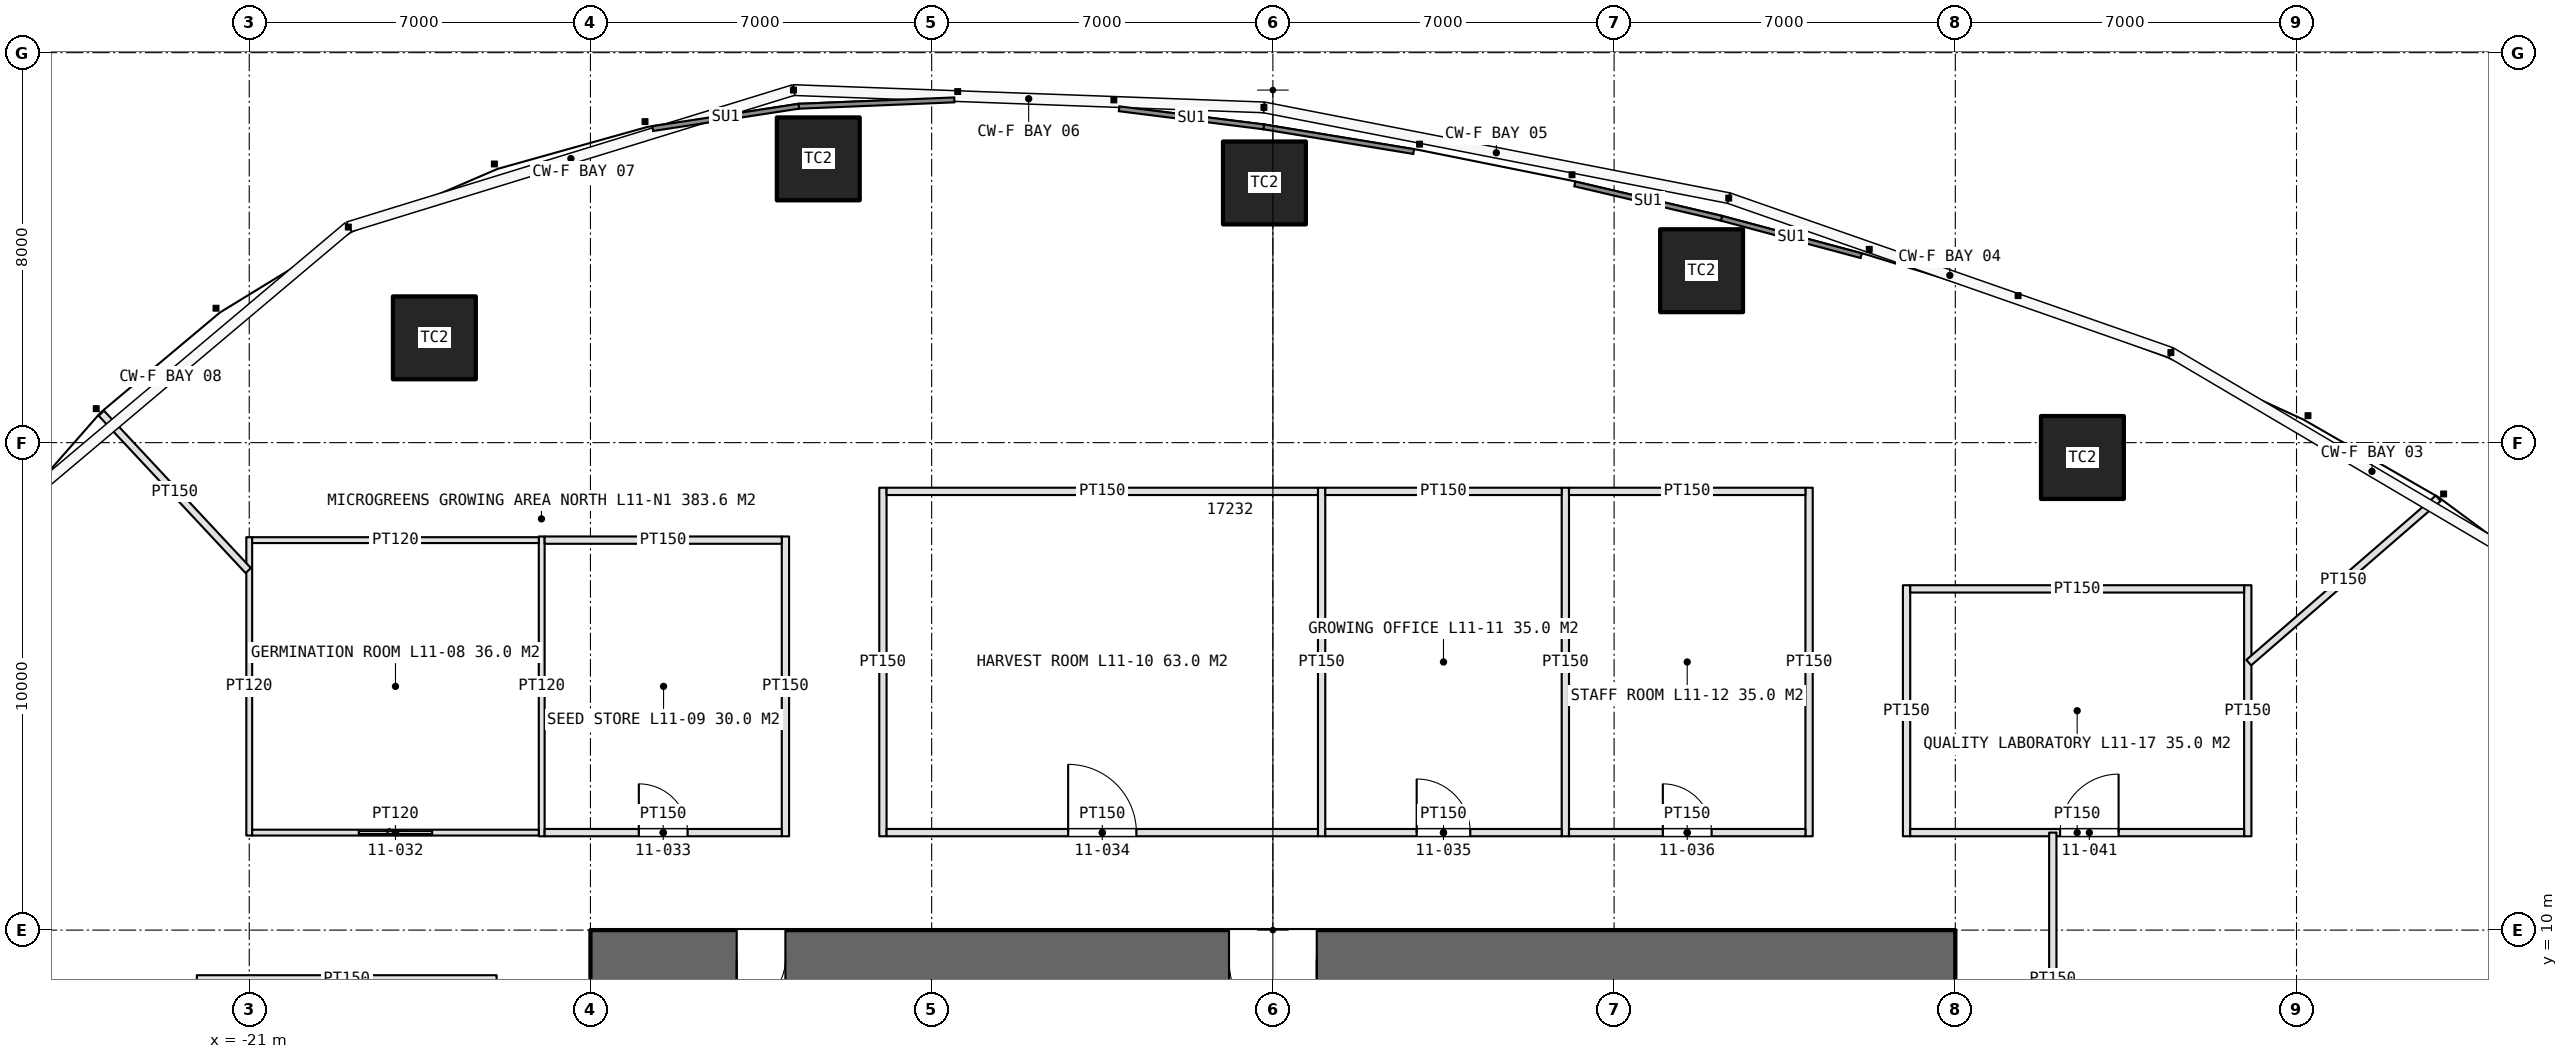
"""IFC4 building model, lengths in metres.
Left out: names, types, materials, properties, quantities, classifications, styles, units other than length and angle.
Written with IfcOpenShell. Run it as: python <this file> out.ifc"""

import sys

from ifc_helpers import new_model, si_unit, direction, frame, frame_2d, origin, origin_2d, place, context, subcontext, project, spatial, rectangle, extrude, element, fill, save


model = new_model("IFC4")
c1 = context("Model", 3, precision=1e-05, world=origin(), true_north=direction((0.0, 1.0)))
c2 = subcontext(c1, "Body", "Model", "MODEL_VIEW")
j1 = project(units=[si_unit("LENGTHUNIT", "METRE"), si_unit("PLANEANGLEUNIT", "RADIAN")], contexts=[c1])
p1 = place(None, origin())
s1 = spatial("IfcSite", under=j1, at=p1, CompositionType="ELEMENT")
p2 = place(p1, origin())
s2 = spatial("IfcBuilding", under=s1, at=p2, CompositionType="ELEMENT")
p3 = place(p2, frame((0.0, 0.0, 55.0)))
s3 = spatial("IfcBuildingStorey", under=s2, at=p3, CompositionType="ELEMENT", Elevation=55.0)
p4 = place(p3, frame((14.0, 9.4, 0.0), z_axis=(0.0, 0.0, 1.0), x_axis=(-1.0, 0.0, 0.0)))
e1 = element("IfcWall", 1, at=p4, inside=s3, PredefinedType="SHEAR", context=c2, shape_type="SweptSolid", body=[
    extrude(rectangle(XDim=28.0, YDim=1.2, at=frame_2d((14.0, 0.0))), origin(), (0.0, 0.0, 1.0), 5.0),
])
p5 = place(p4, frame((24.0, 0.0, 0.0)))
e2 = element("IfcOpeningElement", 2, at=p5, cuts=e1, PredefinedType="OPENING", context=c2, shape_type="SweptSolid", body=[
    extrude(rectangle(XDim=1.0, YDim=2.4, at=frame_2d((0.5, 1.2))), frame((0.0, 0.61, 0.0), z_axis=(0.0, -1.0, 0.0), x_axis=(1.0, 0.0, 0.0)), (0.0, 0.0, 1.0), 1.22),
])
p6 = place(p4, frame((13.1, 0.0, 0.0)))
e3 = element("IfcOpeningElement", 3, at=p6, cuts=e1, PredefinedType="OPENING", context=c2, shape_type="SweptSolid", body=[
    extrude(rectangle(XDim=1.8, YDim=2.4, at=frame_2d((0.9, 1.2))), frame((0.0, 0.61, 0.0), z_axis=(0.0, -1.0, 0.0), x_axis=(1.0, 0.0, 0.0)), (0.0, 0.0, 1.0), 1.22),
])
for number, where, z_axis, x_axis in (
    (4, (16.608, 19.695, 0.0), (0.0, 0.0, 1.0), (1.0, 0.0, 0.0)),
    (5, (8.795, 23.527, 0.0), (0.0, 0.0, 1.0), (1.0, 0.0, 0.0)),
    (6, (-0.173, 25.327, 0.0), (0.0, 0.0, 1.0), (1.0, 0.0, 0.0)),
    (7, (-9.326, 25.821, 0.0), (0.0, 0.0, 1.0), (1.0, 0.0, 0.0)),
    (8, (-17.202, 22.15, 0.0), (0.0, 0.0, 1.0), (1.0, 0.0, 0.0)),
):
    element("IfcColumn", number, at=place(p3, frame(where, z_axis=z_axis, x_axis=x_axis)), inside=s3, PredefinedType="COLUMN", context=c2, shape_type="SweptSolid", body=[
        extrude(rectangle(XDim=1.7, YDim=1.7, at=origin_2d()), origin(), (0.0, 0.0, 1.0), 5.0),
    ])
p7 = place(p3, frame((-21.0, 11.94, 0.0), z_axis=(0.0, 0.0, 1.0), x_axis=(0.0, 1.0, 0.0)))
e9 = element("IfcWall", 9, at=p7, inside=s3, PredefinedType="PARTITIONING", context=c2, shape_type="SweptSolid", body=[
    extrude(rectangle(XDim=6.12, YDim=0.12, at=frame_2d((3.06, 0.0))), origin(), (0.0, 0.0, 1.0), 3.6),
])
p8 = place(p3, frame((-15.0, 11.925, 0.0), z_axis=(0.0, 0.0, 1.0), x_axis=(0.0, 1.0, 0.0)))
e10 = element("IfcWall", 10, at=p8, inside=s3, PredefinedType="PARTITIONING", context=c2, shape_type="SweptSolid", body=[
    extrude(rectangle(XDim=6.15, YDim=0.12, at=frame_2d((3.075, 0.0))), origin(), (0.0, 0.0, 1.0), 3.6),
])
p9 = place(p3, frame((-10.0, 11.925, 0.0), z_axis=(0.0, 0.0, 1.0), x_axis=(0.0, 1.0, 0.0)))
e11 = element("IfcWall", 11, at=p9, inside=s3, PredefinedType="PARTITIONING", context=c2, shape_type="SweptSolid", body=[
    extrude(rectangle(XDim=6.15, YDim=0.15, at=frame_2d((3.075, 0.0))), origin(), (0.0, 0.0, 1.0), 3.6),
])
p10 = place(p3, frame((-20.94, 12.0, 0.0), z_axis=(0.0, 0.0, 1.0), x_axis=(1.0, 0.0, 0.0)))
e12 = element("IfcWall", 12, at=p10, inside=s3, PredefinedType="PARTITIONING", context=c2, shape_type="SweptSolid", body=[
    extrude(rectangle(XDim=5.88, YDim=0.12, at=frame_2d((2.94, 0.0))), origin(), (0.0, 0.0, 1.0), 3.6),
])
p11 = place(p10, frame((2.19, 0.0, 0.0)))
e13 = element("IfcOpeningElement", 13, at=p11, cuts=e12, PredefinedType="OPENING", context=c2, shape_type="SweptSolid", body=[
    extrude(rectangle(XDim=1.5, YDim=2.5, at=frame_2d((0.75, 1.25))), frame((0.0, 0.07, 0.0), z_axis=(0.0, -1.0, 0.0), x_axis=(1.0, 0.0, 0.0)), (0.0, 0.0, 1.0), 0.14),
])
p12 = place(p3, frame((-20.94, 18.0, 0.0), z_axis=(0.0, 0.0, 1.0), x_axis=(1.0, 0.0, 0.0)))
e14 = element("IfcWall", 14, at=p12, inside=s3, PredefinedType="PARTITIONING", context=c2, shape_type="SweptSolid", body=[
    extrude(rectangle(XDim=5.88, YDim=0.12, at=frame_2d((2.94, 0.0))), origin(), (0.0, 0.0, 1.0), 3.6),
])
p13 = place(p3, frame((-14.94, 12.0, 0.0), z_axis=(0.0, 0.0, 1.0), x_axis=(1.0, 0.0, 0.0)))
e15 = element("IfcWall", 15, at=p13, inside=s3, PredefinedType="PARTITIONING", context=c2, shape_type="SweptSolid", body=[
    extrude(rectangle(XDim=4.865, YDim=0.15, at=frame_2d((2.433, 0.0))), origin(), (0.0, 0.0, 1.0), 3.6),
])
p14 = place(p13, frame((1.933, 0.0, 0.0)))
e16 = element("IfcOpeningElement", 16, at=p14, cuts=e15, PredefinedType="OPENING", context=c2, shape_type="SweptSolid", body=[
    extrude(rectangle(XDim=1.0, YDim=2.2, at=frame_2d((0.5, 1.1))), frame((0.0, 0.085, 0.0), z_axis=(0.0, -1.0, 0.0), x_axis=(1.0, 0.0, 0.0)), (0.0, 0.0, 1.0), 0.17),
])
p15 = place(p3, frame((-14.94, 18.0, 0.0), z_axis=(0.0, 0.0, 1.0), x_axis=(1.0, 0.0, 0.0)))
e17 = element("IfcWall", 17, at=p15, inside=s3, PredefinedType="PARTITIONING", context=c2, shape_type="SweptSolid", body=[
    extrude(rectangle(XDim=4.865, YDim=0.15, at=frame_2d((2.433, 0.0))), origin(), (0.0, 0.0, 1.0), 3.6),
])
for number, where, z_axis, x_axis in (
    (18, (-8.0, 11.925, 0.0), (0.0, 0.0, 1.0), (0.0, 1.0, 0.0)),
    (19, (1.0, 11.925, 0.0), (0.0, 0.0, 1.0), (0.0, 1.0, 0.0)),
    (20, (6.0, 11.925, 0.0), (0.0, 0.0, 1.0), (0.0, 1.0, 0.0)),
    (21, (11.0, 11.925, 0.0), (0.0, 0.0, 1.0), (0.0, 1.0, 0.0)),
):
    element("IfcWall", number, at=place(p3, frame(where, z_axis=z_axis, x_axis=x_axis)), inside=s3, PredefinedType="PARTITIONING", context=c2, shape_type="SweptSolid", body=[
        extrude(rectangle(XDim=7.15, YDim=0.15, at=frame_2d((3.575, 0.0))), origin(), (0.0, 0.0, 1.0), 3.6),
    ])
p16 = place(p3, frame((-7.925, 12.0, 0.0), z_axis=(0.0, 0.0, 1.0), x_axis=(1.0, 0.0, 0.0)))
e22 = element("IfcWall", 22, at=p16, inside=s3, PredefinedType="PARTITIONING", context=c2, shape_type="SweptSolid", body=[
    extrude(rectangle(XDim=8.85, YDim=0.15, at=frame_2d((4.425, 0.0))), origin(), (0.0, 0.0, 1.0), 3.6),
])
p17 = place(p16, frame((3.725, 0.0, 0.0)))
e23 = element("IfcOpeningElement", 23, at=p17, cuts=e22, PredefinedType="OPENING", context=c2, shape_type="SweptSolid", body=[
    extrude(rectangle(XDim=1.4, YDim=2.4, at=frame_2d((0.7, 1.2))), frame((0.0, 0.085, 0.0), z_axis=(0.0, -1.0, 0.0), x_axis=(1.0, 0.0, 0.0)), (0.0, 0.0, 1.0), 0.17),
])
p18 = place(p3, frame((-7.925, 19.0, 0.0), z_axis=(0.0, 0.0, 1.0), x_axis=(1.0, 0.0, 0.0)))
e24 = element("IfcWall", 24, at=p18, inside=s3, PredefinedType="PARTITIONING", context=c2, shape_type="SweptSolid", body=[
    extrude(rectangle(XDim=8.85, YDim=0.15, at=frame_2d((4.425, 0.0))), origin(), (0.0, 0.0, 1.0), 3.6),
])
p19 = place(p3, frame((1.075, 12.0, 0.0), z_axis=(0.0, 0.0, 1.0), x_axis=(1.0, 0.0, 0.0)))
e25 = element("IfcWall", 25, at=p19, inside=s3, PredefinedType="PARTITIONING", context=c2, shape_type="SweptSolid", body=[
    extrude(rectangle(XDim=4.85, YDim=0.15, at=frame_2d((2.425, 0.0))), origin(), (0.0, 0.0, 1.0), 3.6),
])
p20 = place(p19, frame((1.875, 0.0, 0.0)))
e26 = element("IfcOpeningElement", 26, at=p20, cuts=e25, PredefinedType="OPENING", context=c2, shape_type="SweptSolid", body=[
    extrude(rectangle(XDim=1.1, YDim=2.3, at=frame_2d((0.55, 1.15))), frame((0.0, 0.085, 0.0), z_axis=(0.0, -1.0, 0.0), x_axis=(1.0, 0.0, 0.0)), (0.0, 0.0, 1.0), 0.17),
])
p21 = place(p3, frame((1.075, 19.0, 0.0), z_axis=(0.0, 0.0, 1.0), x_axis=(1.0, 0.0, 0.0)))
e27 = element("IfcWall", 27, at=p21, inside=s3, PredefinedType="PARTITIONING", context=c2, shape_type="SweptSolid", body=[
    extrude(rectangle(XDim=4.85, YDim=0.15, at=frame_2d((2.425, 0.0))), origin(), (0.0, 0.0, 1.0), 3.6),
])
p22 = place(p3, frame((6.075, 12.0, 0.0), z_axis=(0.0, 0.0, 1.0), x_axis=(1.0, 0.0, 0.0)))
e28 = element("IfcWall", 28, at=p22, inside=s3, PredefinedType="PARTITIONING", context=c2, shape_type="SweptSolid", body=[
    extrude(rectangle(XDim=4.85, YDim=0.15, at=frame_2d((2.425, 0.0))), origin(), (0.0, 0.0, 1.0), 3.6),
])
p23 = place(p22, frame((1.925, 0.0, 0.0)))
e29 = element("IfcOpeningElement", 29, at=p23, cuts=e28, PredefinedType="OPENING", context=c2, shape_type="SweptSolid", body=[
    extrude(rectangle(XDim=1.0, YDim=2.2, at=frame_2d((0.5, 1.1))), frame((0.0, 0.085, 0.0), z_axis=(0.0, -1.0, 0.0), x_axis=(1.0, 0.0, 0.0)), (0.0, 0.0, 1.0), 0.17),
])
p24 = place(p3, frame((6.075, 19.0, 0.0), z_axis=(0.0, 0.0, 1.0), x_axis=(1.0, 0.0, 0.0)))
e30 = element("IfcWall", 30, at=p24, inside=s3, PredefinedType="PARTITIONING", context=c2, shape_type="SweptSolid", body=[
    extrude(rectangle(XDim=4.85, YDim=0.15, at=frame_2d((2.425, 0.0))), origin(), (0.0, 0.0, 1.0), 3.6),
])
p25 = place(p3, frame((-15.925, 9.0, 0.0), z_axis=(0.0, 0.0, 1.0), x_axis=(-1.0, 0.0, 0.0)))
e31 = element("IfcWall", 31, at=p25, inside=s3, PredefinedType="PARTITIONING", context=c2, shape_type="SweptSolid", body=[
    extrude(rectangle(XDim=6.15, YDim=0.15, at=frame_2d((3.075, 0.0))), origin(), (0.0, 0.0, 1.0), 3.6),
])
for number, where, z_axis, x_axis in (
    (32, (13.0, 11.925, 0.0), (0.0, 0.0, 1.0), (0.0, 1.0, 0.0)),
    (33, (20.0, 11.925, 0.0), (0.0, 0.0, 1.0), (0.0, 1.0, 0.0)),
):
    element("IfcWall", number, at=place(p3, frame(where, z_axis=z_axis, x_axis=x_axis)), inside=s3, PredefinedType="PARTITIONING", context=c2, shape_type="SweptSolid", body=[
        extrude(rectangle(XDim=5.15, YDim=0.15, at=frame_2d((2.575, 0.0))), origin(), (0.0, 0.0, 1.0), 3.6),
    ])
p26 = place(p3, frame((13.075, 12.0, 0.0), z_axis=(0.0, 0.0, 1.0), x_axis=(1.0, 0.0, 0.0)))
e34 = element("IfcWall", 34, at=p26, inside=s3, PredefinedType="PARTITIONING", context=c2, shape_type="SweptSolid", body=[
    extrude(rectangle(XDim=6.85, YDim=0.15, at=frame_2d((3.425, 0.0))), origin(), (0.0, 0.0, 1.0), 3.6),
])
p27 = place(p26, frame((3.075, 0.0, 0.0)))
e35 = element("IfcOpeningElement", 35, at=p27, cuts=e34, PredefinedType="OPENING", context=c2, shape_type="SweptSolid", body=[
    extrude(rectangle(XDim=1.2, YDim=2.3, at=frame_2d((0.6, 1.15))), frame((0.0, 0.085, 0.0), z_axis=(0.0, -1.0, 0.0), x_axis=(1.0, 0.0, 0.0)), (0.0, 0.0, 1.0), 0.17),
])
p28 = place(p3, frame((13.075, 17.0, 0.0), z_axis=(0.0, 0.0, 1.0), x_axis=(1.0, 0.0, 0.0)))
e36 = element("IfcWall", 36, at=p28, inside=s3, PredefinedType="PARTITIONING", context=c2, shape_type="SweptSolid", body=[
    extrude(rectangle(XDim=6.85, YDim=0.15, at=frame_2d((3.425, 0.0))), origin(), (0.0, 0.0, 1.0), 3.6),
])
p29 = place(p3, frame((-21.02, 17.375, 0.0), z_axis=(0.0, 0.0, 1.0), x_axis=(-0.682511222631, 0.730875113123, 0.0)))
e37 = element("IfcWall", 37, at=p29, inside=s3, PredefinedType="PARTITIONING", context=c2, shape_type="SweptSolid", body=[
    extrude(rectangle(XDim=4.417, YDim=0.15, at=frame_2d((2.208, 0.0))), origin(), (0.0, 0.0, 1.0), 3.6),
])
p30 = place(p3, frame((20.02, 15.487, 0.0), z_axis=(0.0, 0.0, 1.0), x_axis=(0.755443308786, 0.655214016342, 0.0)))
e38 = element("IfcWall", 38, at=p30, inside=s3, PredefinedType="PARTITIONING", context=c2, shape_type="SweptSolid", body=[
    extrude(rectangle(XDim=5.147, YDim=0.15, at=frame_2d((2.573, 0.0))), origin(), (0.0, 0.0, 1.0), 3.6),
])
p31 = place(p3, frame((16.0, 6.0, 0.0), z_axis=(0.0, 0.0, 1.0), x_axis=(0.0, 1.0, 0.0)))
e39 = element("IfcWall", 39, at=p31, inside=s3, PredefinedType="PARTITIONING", context=c2, shape_type="SweptSolid", body=[
    extrude(rectangle(XDim=6.0, YDim=0.15, at=frame_2d((3.0, 0.0))), origin(), (0.0, 0.0, 1.0), 3.6),
])
p32 = place(p5, origin())
e40 = element("IfcDoor", 40, at=p32, inside=s3, OperationType="SINGLE_SWING_RIGHT", PredefinedType="DOOR", context=c2, shape_type="SweptSolid", body=[
    extrude(rectangle(XDim=1.0, YDim=2.4, at=frame_2d((0.5, 1.2))), frame((0.0, 0.025, 0.0), z_axis=(0.0, -1.0, 0.0), x_axis=(1.0, 0.0, 0.0)), (0.0, 0.0, 1.0), 0.05),
])
fill(e2, e40)
p33 = place(p6, origin())
e41 = element("IfcDoor", 41, at=p33, inside=s3, OperationType="DOUBLE_DOOR_SINGLE_SWING", PredefinedType="DOOR", context=c2, shape_type="SweptSolid", body=[
    extrude(rectangle(XDim=1.8, YDim=2.4, at=frame_2d((0.9, 1.2))), frame((0.0, 0.025, 0.0), z_axis=(0.0, -1.0, 0.0), x_axis=(1.0, 0.0, 0.0)), (0.0, 0.0, 1.0), 0.05),
])
fill(e3, e41)
p34 = place(p11, origin())
e42 = element("IfcDoor", 42, at=p34, inside=s3, OperationType="SLIDING_TO_LEFT", PredefinedType="DOOR", context=c2, shape_type="SweptSolid", body=[
    extrude(rectangle(XDim=1.5, YDim=2.5, at=frame_2d((0.75, 1.25))), frame((0.0, 0.025, 0.0), z_axis=(0.0, -1.0, 0.0), x_axis=(1.0, 0.0, 0.0)), (0.0, 0.0, 1.0), 0.05),
])
fill(e13, e42)
p35 = place(p14, origin())
e43 = element("IfcDoor", 43, at=p35, inside=s3, OperationType="SINGLE_SWING_LEFT", PredefinedType="DOOR", context=c2, shape_type="SweptSolid", body=[
    extrude(rectangle(XDim=1.0, YDim=2.2, at=frame_2d((0.5, 1.1))), frame((0.0, 0.025, 0.0), z_axis=(0.0, -1.0, 0.0), x_axis=(1.0, 0.0, 0.0)), (0.0, 0.0, 1.0), 0.05),
])
fill(e16, e43)
p36 = place(p17, origin())
e44 = element("IfcDoor", 44, at=p36, inside=s3, OperationType="DOUBLE_DOOR_DOUBLE_SWING", PredefinedType="DOOR", context=c2, shape_type="SweptSolid", body=[
    extrude(rectangle(XDim=1.4, YDim=2.4, at=frame_2d((0.7, 1.2))), frame((0.0, 0.025, 0.0), z_axis=(0.0, -1.0, 0.0), x_axis=(1.0, 0.0, 0.0)), (0.0, 0.0, 1.0), 0.05),
])
fill(e23, e44)
p37 = place(p20, origin())
e45 = element("IfcDoor", 45, at=p37, inside=s3, OperationType="SINGLE_SWING_LEFT", PredefinedType="DOOR", context=c2, shape_type="SweptSolid", body=[
    extrude(rectangle(XDim=1.1, YDim=2.3, at=frame_2d((0.55, 1.15))), frame((0.0, 0.025, 0.0), z_axis=(0.0, -1.0, 0.0), x_axis=(1.0, 0.0, 0.0)), (0.0, 0.0, 1.0), 0.05),
])
fill(e26, e45)
p38 = place(p23, origin())
e46 = element("IfcDoor", 46, at=p38, inside=s3, OperationType="SINGLE_SWING_LEFT", PredefinedType="DOOR", context=c2, shape_type="SweptSolid", body=[
    extrude(rectangle(XDim=1.0, YDim=2.2, at=frame_2d((0.5, 1.1))), frame((0.0, 0.025, 0.0), z_axis=(0.0, -1.0, 0.0), x_axis=(1.0, 0.0, 0.0)), (0.0, 0.0, 1.0), 0.05),
])
fill(e29, e46)
p39 = place(p27, origin())
e47 = element("IfcDoor", 47, at=p39, inside=s3, OperationType="SINGLE_SWING_RIGHT", PredefinedType="DOOR", context=c2, shape_type="SweptSolid", body=[
    extrude(rectangle(XDim=1.2, YDim=2.3, at=frame_2d((0.6, 1.15))), frame((0.0, 0.025, 0.0), z_axis=(0.0, -1.0, 0.0), x_axis=(1.0, 0.0, 0.0)), (0.0, 0.0, 1.0), 0.05),
])
fill(e35, e47)
save(model, sys.argv[1])
